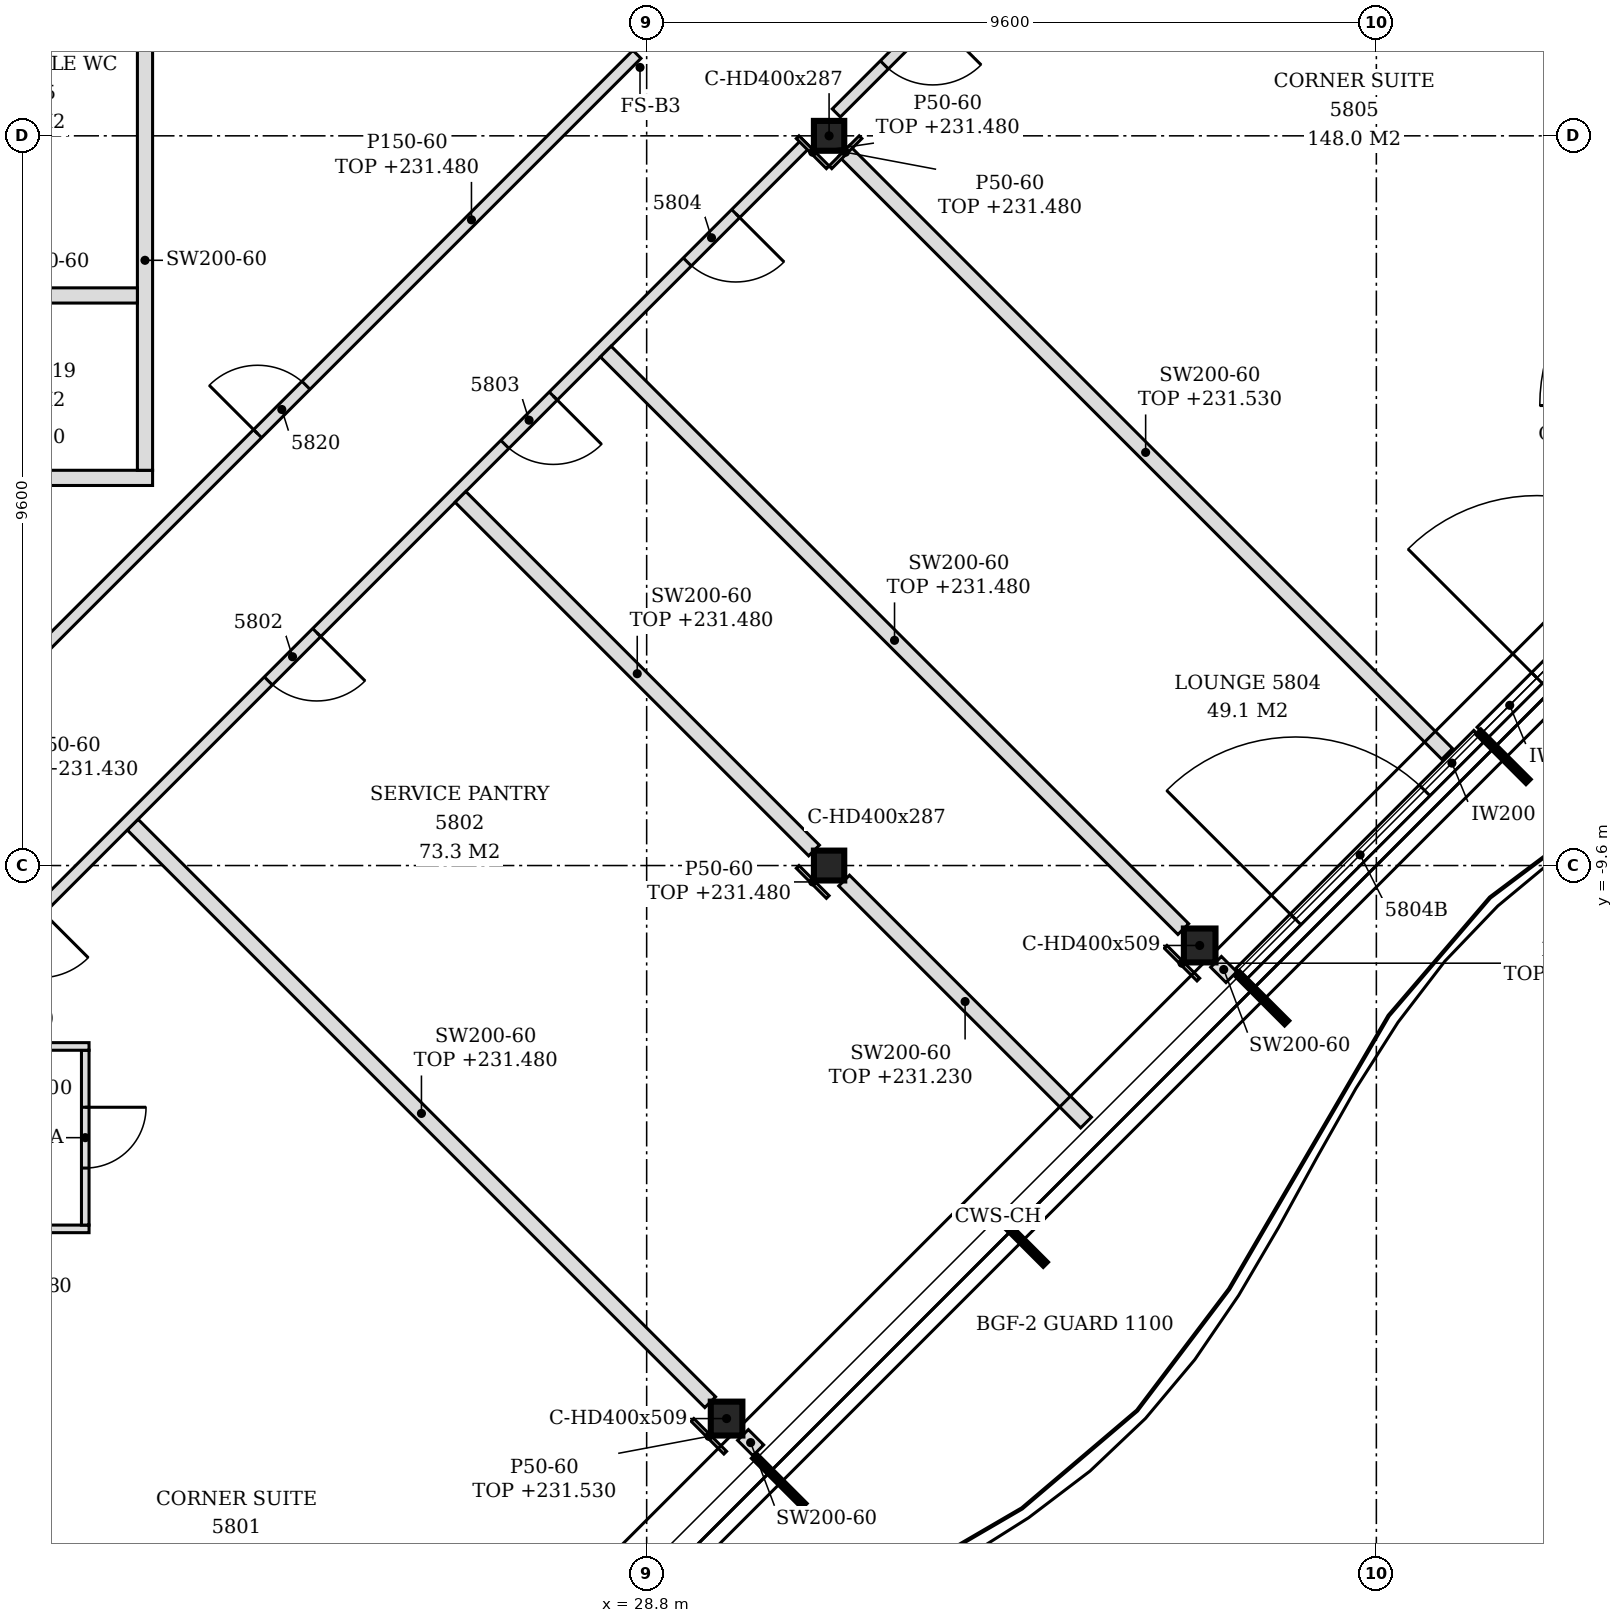
"""IFC4 building model, lengths in metres.
Left out: names, types, materials, properties, quantities, classifications, styles, units other than length and angle.
Written with IfcOpenShell. Run it as: python <this file> out.ifc"""

import sys

from ifc_helpers import new_model, si_unit, direction, frame, frame_2d, origin, origin_2d, place, context, subcontext, project, spatial, polyline, rectangle, i_section, outline, extrude, element, fill, save


model = new_model("IFC4")
c1 = context("Model", 3, precision=1e-05, world=origin(), true_north=direction((0.0, 1.0)))
c2 = subcontext(c1, "Body", "Model", "MODEL_VIEW")
j1 = project(units=[si_unit("LENGTHUNIT", "METRE"), si_unit("PLANEANGLEUNIT", "RADIAN")], contexts=[c1])
p1 = place(None, origin())
s1 = spatial("IfcSite", under=j1, at=p1, CompositionType="ELEMENT")
p2 = place(p1, origin())
s2 = spatial("IfcBuilding", under=s1, at=p2, CompositionType="ELEMENT")
p3 = place(p2, frame((0.0, 0.0, 228.6)))
s3 = spatial("IfcBuildingStorey", under=s2, at=p3, CompositionType="ELEMENT", Elevation=228.6)
for number, where, z_axis, x_axis in (
    (1, (29.852, -16.876, -0.15), (0.0, 0.0, 1.0), (1.0, 0.0, 0.0)),
    (2, (36.076, -10.652, -0.15), (0.0, 0.0, 1.0), (1.0, 0.0, 0.0)),
):
    element("IfcColumn", number, at=place(p3, frame(where, z_axis=z_axis, x_axis=x_axis)), inside=s3, PredefinedType="COLUMN", context=c2, shape_type="SweptSolid", body=[
        extrude(i_section(OverallWidth=0.416, OverallDepth=0.446, WebThickness=0.039, FlangeThickness=0.063, FilletRadius=0.015, at=origin_2d()), origin(), (0.0, 0.0, 1.0), 3.6),
    ])
for number, where, z_axis, x_axis in (
    (3, (31.2, -9.6, -0.15), (0.0, 0.0, 1.0), (1.0, 0.0, 0.0)),
    (4, (31.2, 0.0, -0.15), (0.0, 0.0, 1.0), (1.0, 0.0, 0.0)),
):
    element("IfcColumn", number, at=place(p3, frame(where, z_axis=z_axis, x_axis=x_axis)), inside=s3, PredefinedType="COLUMN", context=c2, shape_type="SweptSolid", body=[
        extrude(i_section(OverallWidth=0.399, OverallDepth=0.393, WebThickness=0.023, FlangeThickness=0.037, FilletRadius=0.015, at=origin_2d()), origin(), (0.0, 0.0, 1.0), 3.6),
    ])
p4 = place(p3, frame((36.62, -11.026, 0.0), z_axis=(0.0, 0.0, 1.0), x_axis=(0.707106781187, 0.707106781187, 0.0)))
e5 = element("IfcWall", 5, at=p4, inside=s3, PredefinedType="NOTDEFINED", context=c2, shape_type="SweptSolid", body=[
    extrude(rectangle(XDim=4.431, YDim=0.2, at=frame_2d((2.215, 0.0))), origin(), (0.0, 0.0, 1.0), 3.45),
])
p5 = place(p4, frame((1.015, 0.0, 0.0)))
e6 = element("IfcOpeningElement", 6, at=p5, cuts=e5, PredefinedType="OPENING", context=c2, shape_type="SweptSolid", body=[
    extrude(rectangle(XDim=2.4, YDim=2.4, at=frame_2d((1.2, 1.2))), frame((0.0, 0.11, 0.0), z_axis=(0.0, -1.0, 0.0), x_axis=(1.0, 0.0, 0.0)), (0.0, 0.0, 1.0), 0.22),
])
p6 = place(p3, frame((39.796, -7.851, 0.0), z_axis=(0.0, 0.0, 1.0), x_axis=(0.707079168996, 0.707134392299, 0.0)))
e7 = element("IfcWall", 7, at=p6, inside=s3, PredefinedType="NOTDEFINED", context=c2, shape_type="SweptSolid", body=[
    extrude(rectangle(XDim=4.421, YDim=0.2, at=frame_2d((2.21, 0.0))), origin(), (0.0, 0.0, 1.0), 3.45),
])
p7 = place(p6, frame((1.015, 0.0, 0.0)))
e8 = element("IfcOpeningElement", 8, at=p7, cuts=e7, PredefinedType="OPENING", context=c2, shape_type="SweptSolid", body=[
    extrude(rectangle(XDim=2.4, YDim=2.4, at=frame_2d((1.2, 1.2))), frame((0.0, 0.11, 0.0), z_axis=(0.0, -1.0, 0.0), x_axis=(1.0, 0.0, 0.0)), (0.0, 0.0, 1.0), 0.22),
])
p8 = place(p3, frame((30.269, -17.293, 0.0), z_axis=(0.0, 0.0, 1.0), x_axis=(-0.707106781187, 0.707106781187, 0.0)))
e9 = element("IfcWall", 9, at=p8, inside=s3, PredefinedType="PARTITIONING", context=c2, shape_type="SweptSolid", body=[
    extrude(rectangle(XDim=0.285, YDim=0.2, at=frame_2d((0.143, 0.0))), origin(), (0.0, 0.0, 1.0), 3.45),
])
p9 = place(p3, frame((29.636, -16.66, 0.0), z_axis=(0.0, 0.0, 1.0), x_axis=(-0.707095420673, 0.707118141518, 0.0)))
e10 = element("IfcWall", 10, at=p9, inside=s3, PredefinedType="PARTITIONING", context=c2, shape_type="SweptSolid", body=[
    extrude(rectangle(XDim=10.745, YDim=0.2, at=frame_2d((5.373, 0.0))), origin(), (0.0, 0.0, 1.0), 2.88),
])
p10 = place(p3, frame((19.114, -14.38, 0.0), z_axis=(0.0, 0.0, 1.0), x_axis=(1.0, 0.0, 0.0)))
e11 = element("IfcWall", 11, at=p10, inside=s3, PredefinedType="PARTITIONING", context=c2, shape_type="SweptSolid", body=[
    extrude(outline(polyline([(0.0, 0.0), (2.35, 0.0), (2.35, 2.88), (0.236, 2.88), (0.234, 2.73), (0.0, 2.73), (0.0, 0.0)])), frame((0.0, 0.05, 0.0), z_axis=(0.0, -1.0, 0.0), x_axis=(1.0, 0.0, 0.0)), (0.0, 0.0, 1.0), 0.1),
])
p11 = place(p3, frame((16.722, -14.272, 0.0), z_axis=(0.0, 0.0, 1.0), x_axis=(0.707106781187, 0.707106781187, 0.0)))
e12 = element("IfcWall", 12, at=p11, inside=s3, PredefinedType="PARTITIONING", context=c2, shape_type="SweptSolid", body=[
    extrude(rectangle(XDim=20.049, YDim=0.15, at=frame_2d((10.025, 0.0))), origin(), (0.0, 0.0, 1.0), 2.73),
])
p12 = place(p11, frame((4.892, 0.0, 0.0)))
e13 = element("IfcOpeningElement", 13, at=p12, cuts=e12, PredefinedType="OPENING", context=c2, shape_type="SweptSolid", body=[
    extrude(rectangle(XDim=0.9, YDim=2.1, at=frame_2d((0.45, 1.05))), frame((0.0, 0.085, 0.0), z_axis=(0.0, -1.0, 0.0), x_axis=(1.0, 0.0, 0.0)), (0.0, 0.0, 1.0), 0.17),
])
p13 = place(p11, frame((10.042, 0.0, 0.0)))
e14 = element("IfcOpeningElement", 14, at=p13, cuts=e12, PredefinedType="OPENING", context=c2, shape_type="SweptSolid", body=[
    extrude(rectangle(XDim=0.9, YDim=2.1, at=frame_2d((0.45, 1.05))), frame((0.0, 0.085, 0.0), z_axis=(0.0, -1.0, 0.0), x_axis=(1.0, 0.0, 0.0)), (0.0, 0.0, 1.0), 0.17),
])
p14 = place(p11, frame((14.443, 0.0, 0.0)))
e15 = element("IfcOpeningElement", 15, at=p14, cuts=e12, PredefinedType="OPENING", context=c2, shape_type="SweptSolid", body=[
    extrude(rectangle(XDim=0.9, YDim=2.1, at=frame_2d((0.45, 1.05))), frame((0.0, 0.085, 0.0), z_axis=(0.0, -1.0, 0.0), x_axis=(1.0, 0.0, 0.0)), (0.0, 0.0, 1.0), 0.17),
])
p15 = place(p11, frame((17.837, 0.0, 0.0)))
e16 = element("IfcOpeningElement", 16, at=p15, cuts=e12, PredefinedType="OPENING", context=c2, shape_type="SweptSolid", body=[
    extrude(rectangle(XDim=0.9, YDim=2.1, at=frame_2d((0.45, 1.05))), frame((0.0, 0.085, 0.0), z_axis=(0.0, -1.0, 0.0), x_axis=(1.0, 0.0, 0.0)), (0.0, 0.0, 1.0), 0.17),
])
p16 = place(p3, frame((21.414, -14.33, 0.0), z_axis=(0.0, 0.0, 1.0), x_axis=(0.0, 1.0, 0.0)))
e17 = element("IfcWall", 17, at=p16, inside=s3, PredefinedType="PARTITIONING", context=c2, shape_type="SweptSolid", body=[
    extrude(outline(polyline([(0.0, 0.0), (2.3, 0.0), (2.3, 3.45), (0.035, 3.45), (0.033, 2.88), (0.0, 2.88), (0.0, 0.0)])), frame((0.0, 0.05, 0.0), z_axis=(0.0, -1.0, 0.0), x_axis=(1.0, 0.0, 0.0)), (0.0, 0.0, 1.0), 0.1),
])
p17 = place(p16, frame((0.75, 0.0, 0.0)))
e18 = element("IfcOpeningElement", 18, at=p17, cuts=e17, PredefinedType="OPENING", context=c2, shape_type="SweptSolid", body=[
    extrude(rectangle(XDim=0.8, YDim=2.1, at=frame_2d((0.4, 1.05))), frame((0.0, 0.06, 0.0), z_axis=(0.0, -1.0, 0.0), x_axis=(1.0, 0.0, 0.0)), (0.0, 0.0, 1.0), 0.12),
])
p18 = place(p3, frame((34.581, -12.981, 0.0), z_axis=(0.0, 0.0, 1.0), x_axis=(-0.707133900936, 0.707079660397, 0.0)))
e19 = element("IfcWall", 19, at=p18, inside=s3, PredefinedType="PARTITIONING", context=c2, shape_type="SweptSolid", body=[
    extrude(rectangle(XDim=4.501, YDim=0.2, at=frame_2d((2.25, 0.0))), origin(), (0.0, 0.0, 1.0), 2.63),
])
p19 = place(p3, frame((19.17, -11.98, 0.0), z_axis=(0.0, 0.0, 1.0), x_axis=(1.0, 0.0, 0.0)))
e20 = element("IfcWall", 20, at=p19, inside=s3, PredefinedType="PARTITIONING", context=c2, shape_type="SweptSolid", body=[
    extrude(outline(polyline([(0.0, 0.0), (2.294, 0.0), (2.294, 3.45), (0.18, 3.45), (0.178, 2.73), (0.0, 2.73), (0.0, 0.0)])), frame((0.0, 0.05, 0.0), z_axis=(0.0, -1.0, 0.0), x_axis=(1.0, 0.0, 0.0)), (0.0, 0.0, 1.0), 0.1),
])
p20 = place(p3, frame((36.493, -11.069, 0.0), z_axis=(0.0, 0.0, 1.0), x_axis=(-0.707534423513, 0.706678880075, 0.0)))
e21 = element("IfcWall", 21, at=p20, inside=s3, PredefinedType="PARTITIONING", context=c2, shape_type="SweptSolid", body=[
    extrude(rectangle(XDim=0.285, YDim=0.2, at=frame_2d((0.143, 0.0))), origin(), (0.0, 0.0, 1.0), 3.45),
])
p21 = place(p3, frame((35.86, -10.436, 0.0), z_axis=(0.0, 0.0, 1.0), x_axis=(-0.707106781187, 0.707106781187, 0.0)))
e22 = element("IfcWall", 22, at=p21, inside=s3, PredefinedType="PARTITIONING", context=c2, shape_type="SweptSolid", body=[
    extrude(rectangle(XDim=10.745, YDim=0.2, at=frame_2d((5.373, 0.0))), origin(), (0.0, 0.0, 1.0), 2.88),
])
p22 = place(p3, frame((31.002, -9.402, 0.0), z_axis=(0.0, 0.0, 1.0), x_axis=(-0.707088226093, 0.707125335793, 0.0)))
e23 = element("IfcWall", 23, at=p22, inside=s3, PredefinedType="PARTITIONING", context=c2, shape_type="SweptSolid", body=[
    extrude(rectangle(XDim=6.579, YDim=0.2, at=frame_2d((3.29, 0.0))), origin(), (0.0, 0.0, 1.0), 2.88),
])
p23 = place(p3, frame((19.398, -8.202, 0.0), z_axis=(0.0, 0.0, 1.0), x_axis=(0.707116088468, 0.707097473782, 0.0)))
e24 = element("IfcWall", 24, at=p23, inside=s3, PredefinedType="PARTITIONING", context=c2, shape_type="SweptSolid", body=[
    extrude(rectangle(XDim=13.115, YDim=0.15, at=frame_2d((6.558, 0.0))), origin(), (0.0, 0.0, 1.0), 2.88),
])
p24 = place(p23, frame((6.058, 0.0, 0.0)))
e25 = element("IfcOpeningElement", 25, at=p24, cuts=e24, PredefinedType="OPENING", context=c2, shape_type="SweptSolid", body=[
    extrude(rectangle(XDim=0.9, YDim=2.1, at=frame_2d((0.45, 1.05))), frame((0.0, 0.085, 0.0), z_axis=(0.0, -1.0, 0.0), x_axis=(1.0, 0.0, 0.0)), (0.0, 0.0, 1.0), 0.17),
])
p25 = place(p3, frame((39.331, -8.131, 0.0), z_axis=(0.0, 0.0, 1.0), x_axis=(-0.707106781187, 0.707106781187, 0.0)))
e26 = element("IfcWall", 26, at=p25, inside=s3, PredefinedType="PARTITIONING", context=c2, shape_type="SweptSolid", body=[
    extrude(rectangle(XDim=11.219, YDim=0.2, at=frame_2d((5.61, 0.0))), origin(), (0.0, 0.0, 1.0), 2.93),
])
p26 = place(p3, frame((19.275, -4.5, 0.0), z_axis=(0.0, 0.0, 1.0), x_axis=(1.0, 0.0, 0.0)))
e27 = element("IfcWall", 27, at=p26, inside=s3, PredefinedType="PARTITIONING", context=c2, shape_type="SweptSolid", body=[
    extrude(outline(polyline([(0.0, 0.0), (3.025, 0.0), (3.025, 3.45), (0.075, 3.45), (0.073, 2.83), (0.0, 2.83), (0.0, 0.0)])), frame((0.0, 0.1, 0.0), z_axis=(0.0, -1.0, 0.0), x_axis=(1.0, 0.0, 0.0)), (0.0, 0.0, 1.0), 0.2),
])
p27 = place(p3, frame((22.2, -4.4, 0.0), z_axis=(0.0, 0.0, 1.0), x_axis=(0.0, 1.0, 0.0)))
e28 = element("IfcWall", 28, at=p27, inside=s3, PredefinedType="PARTITIONING", context=c2, shape_type="SweptSolid", body=[
    extrude(outline(polyline([(0.0, 0.0), (5.525, 0.0), (5.525, 3.45), (4.505, 3.45), (4.503, 2.88), (4.295, 2.88), (4.293, 3.45), (0.0, 3.45), (0.0, 0.0)])), frame((0.0, 0.1, 0.0), z_axis=(0.0, -1.0, 0.0), x_axis=(1.0, 0.0, 0.0)), (0.0, 0.0, 1.0), 0.2),
])
p28 = place(p3, frame((19.275, -2.1, 0.0), z_axis=(0.0, 0.0, 1.0), x_axis=(1.0, 0.0, 0.0)))
e29 = element("IfcWall", 29, at=p28, inside=s3, PredefinedType="PARTITIONING", context=c2, shape_type="SweptSolid", body=[
    extrude(outline(polyline([(0.0, 0.0), (2.825, 0.0), (2.825, 3.45), (0.075, 3.45), (0.073, 2.83), (0.0, 2.83), (0.0, 0.0)])), frame((0.0, 0.1, 0.0), z_axis=(0.0, -1.0, 0.0), x_axis=(1.0, 0.0, 0.0)), (0.0, 0.0, 1.0), 0.2),
])
p29 = place(p3, frame((31.295, 0.301, 0.0), z_axis=(0.0, 0.0, 1.0), x_axis=(0.707146890479, 0.707066669618, 0.0)))
e30 = element("IfcWall", 30, at=p29, inside=s3, PredefinedType="PARTITIONING", context=c2, shape_type="SweptSolid", body=[
    extrude(rectangle(XDim=3.043, YDim=0.15, at=frame_2d((1.522, 0.0))), origin(), (0.0, 0.0, 1.0), 2.93),
])
p30 = place(p29, frame((0.895, 0.0, 0.0)))
e31 = element("IfcOpeningElement", 31, at=p30, cuts=e30, PredefinedType="OPENING", context=c2, shape_type="SweptSolid", body=[
    extrude(rectangle(XDim=0.9, YDim=2.1, at=frame_2d((0.45, 1.05))), frame((0.0, 0.085, 0.0), z_axis=(0.0, -1.0, 0.0), x_axis=(1.0, 0.0, 0.0)), (0.0, 0.0, 1.0), 0.17),
])
p31 = place(p3, frame((29.834, -17.324, 0.0), z_axis=(0.0, 0.0, 1.0), x_axis=(-0.706906496032, 0.707307009627, 0.0)))
e32 = element("IfcWall", 32, at=p31, inside=s3, PredefinedType="PARTITIONING", context=c2, shape_type="SweptSolid", body=[
    extrude(rectangle(XDim=0.61, YDim=0.05, at=frame_2d((0.305, 0.0))), origin(), (0.0, 0.0, 1.0), 2.93),
])
p32 = place(p3, frame((31.218, -0.414, 0.0), z_axis=(0.0, 0.0, 1.0), x_axis=(0.706888841063, 0.707324654159, 0.0)))
e33 = element("IfcWall", 33, at=p32, inside=s3, PredefinedType="PARTITIONING", context=c2, shape_type="SweptSolid", body=[
    extrude(rectangle(XDim=0.56, YDim=0.05, at=frame_2d((0.28, 0.0))), origin(), (0.0, 0.0, 1.0), 2.88),
])
p33 = place(p3, frame((31.182, -10.014, 0.0), z_axis=(0.0, 0.0, 1.0), x_axis=(-0.707106781187, 0.707106781187, 0.0)))
e34 = element("IfcWall", 34, at=p33, inside=s3, PredefinedType="PARTITIONING", context=c2, shape_type="SweptSolid", body=[
    extrude(rectangle(XDim=0.56, YDim=0.05, at=frame_2d((0.28, 0.0))), origin(), (0.0, 0.0, 1.0), 2.88),
])
p34 = place(p3, frame((36.058, -11.1, 0.0), z_axis=(0.0, 0.0, 1.0), x_axis=(-0.707307009627, 0.706906496032, 0.0)))
e35 = element("IfcWall", 35, at=p34, inside=s3, PredefinedType="PARTITIONING", context=c2, shape_type="SweptSolid", body=[
    extrude(rectangle(XDim=0.61, YDim=0.05, at=frame_2d((0.305, 0.0))), origin(), (0.0, 0.0, 1.0), 2.63),
])
p35 = place(p3, frame((31.182, -0.414, 0.0), z_axis=(0.0, 0.0, 1.0), x_axis=(-0.706888841063, 0.707324654159, 0.0)))
e36 = element("IfcWall", 36, at=p35, inside=s3, PredefinedType="PARTITIONING", context=c2, shape_type="SweptSolid", body=[
    extrude(rectangle(XDim=0.56, YDim=0.05, at=frame_2d((0.28, 0.0))), origin(), (0.0, 0.0, 1.0), 2.88),
])
p36 = place(p5, origin())
e37 = element("IfcDoor", 37, at=p36, inside=s3, OperationType="SINGLE_SWING_LEFT", PredefinedType="DOOR", context=c2, shape_type="SweptSolid", body=[
    extrude(rectangle(XDim=2.4, YDim=2.4, at=frame_2d((1.2, 1.2))), frame((0.0, 0.025, 0.0), z_axis=(0.0, -1.0, 0.0), x_axis=(1.0, 0.0, 0.0)), (0.0, 0.0, 1.0), 0.05),
])
fill(e6, e37)
p37 = place(p7, origin())
e38 = element("IfcDoor", 38, at=p37, inside=s3, OperationType="SINGLE_SWING_LEFT", PredefinedType="DOOR", context=c2, shape_type="SweptSolid", body=[
    extrude(rectangle(XDim=2.4, YDim=2.4, at=frame_2d((1.2, 1.2))), frame((0.0, 0.025, 0.0), z_axis=(0.0, -1.0, 0.0), x_axis=(1.0, 0.0, 0.0)), (0.0, 0.0, 1.0), 0.05),
])
fill(e8, e38)
p38 = place(p17, frame((0.8, 0.0, 0.0), z_axis=(0.0, 0.0, 1.0), x_axis=(-1.0, 0.0, 0.0)))
e39 = element("IfcDoor", 39, at=p38, inside=s3, OperationType="SINGLE_SWING_LEFT", PredefinedType="DOOR", context=c2, shape_type="SweptSolid", body=[
    extrude(rectangle(XDim=0.8, YDim=2.1, at=frame_2d((0.4, 1.05))), frame((0.0, 0.025, 0.0), z_axis=(0.0, -1.0, 0.0), x_axis=(1.0, 0.0, 0.0)), (0.0, 0.0, 1.0), 0.05),
])
fill(e18, e39)
p39 = place(p13, frame((0.9, 0.0, 0.0), z_axis=(0.0, 0.0, 1.0), x_axis=(-1.0, 0.0, 0.0)))
e40 = element("IfcDoor", 40, at=p39, inside=s3, OperationType="SINGLE_SWING_LEFT", PredefinedType="DOOR", context=c2, shape_type="SweptSolid", body=[
    extrude(rectangle(XDim=0.9, YDim=2.1, at=frame_2d((0.45, 1.05))), frame((0.0, 0.025, 0.0), z_axis=(0.0, -1.0, 0.0), x_axis=(1.0, 0.0, 0.0)), (0.0, 0.0, 1.0), 0.05),
])
fill(e14, e40)
p40 = place(p14, frame((0.9, 0.0, 0.0), z_axis=(0.0, 0.0, 1.0), x_axis=(-1.0, 0.0, 0.0)))
e41 = element("IfcDoor", 41, at=p40, inside=s3, OperationType="SINGLE_SWING_LEFT", PredefinedType="DOOR", context=c2, shape_type="SweptSolid", body=[
    extrude(rectangle(XDim=0.9, YDim=2.1, at=frame_2d((0.45, 1.05))), frame((0.0, 0.025, 0.0), z_axis=(0.0, -1.0, 0.0), x_axis=(1.0, 0.0, 0.0)), (0.0, 0.0, 1.0), 0.05),
])
fill(e15, e41)
p41 = place(p15, frame((0.9, 0.0, 0.0), z_axis=(0.0, 0.0, 1.0), x_axis=(-1.0, 0.0, 0.0)))
e42 = element("IfcDoor", 42, at=p41, inside=s3, OperationType="SINGLE_SWING_LEFT", PredefinedType="DOOR", context=c2, shape_type="SweptSolid", body=[
    extrude(rectangle(XDim=0.9, YDim=2.1, at=frame_2d((0.45, 1.05))), frame((0.0, 0.025, 0.0), z_axis=(0.0, -1.0, 0.0), x_axis=(1.0, 0.0, 0.0)), (0.0, 0.0, 1.0), 0.05),
])
fill(e16, e42)
p42 = place(p30, frame((0.9, 0.0, 0.0), z_axis=(0.0, 0.0, 1.0), x_axis=(-1.0, 0.0, 0.0)))
e43 = element("IfcDoor", 43, at=p42, inside=s3, OperationType="SINGLE_SWING_LEFT", PredefinedType="DOOR", context=c2, shape_type="SweptSolid", body=[
    extrude(rectangle(XDim=0.9, YDim=2.1, at=frame_2d((0.45, 1.05))), frame((0.0, 0.025, 0.0), z_axis=(0.0, -1.0, 0.0), x_axis=(1.0, 0.0, 0.0)), (0.0, 0.0, 1.0), 0.05),
])
fill(e31, e43)
p43 = place(p24, origin())
e44 = element("IfcDoor", 44, at=p43, inside=s3, OperationType="SINGLE_SWING_LEFT", PredefinedType="DOOR", context=c2, shape_type="SweptSolid", body=[
    extrude(rectangle(XDim=0.9, YDim=2.1, at=frame_2d((0.45, 1.05))), frame((0.0, 0.025, 0.0), z_axis=(0.0, -1.0, 0.0), x_axis=(1.0, 0.0, 0.0)), (0.0, 0.0, 1.0), 0.05),
])
fill(e25, e44)
save(model, sys.argv[1])
